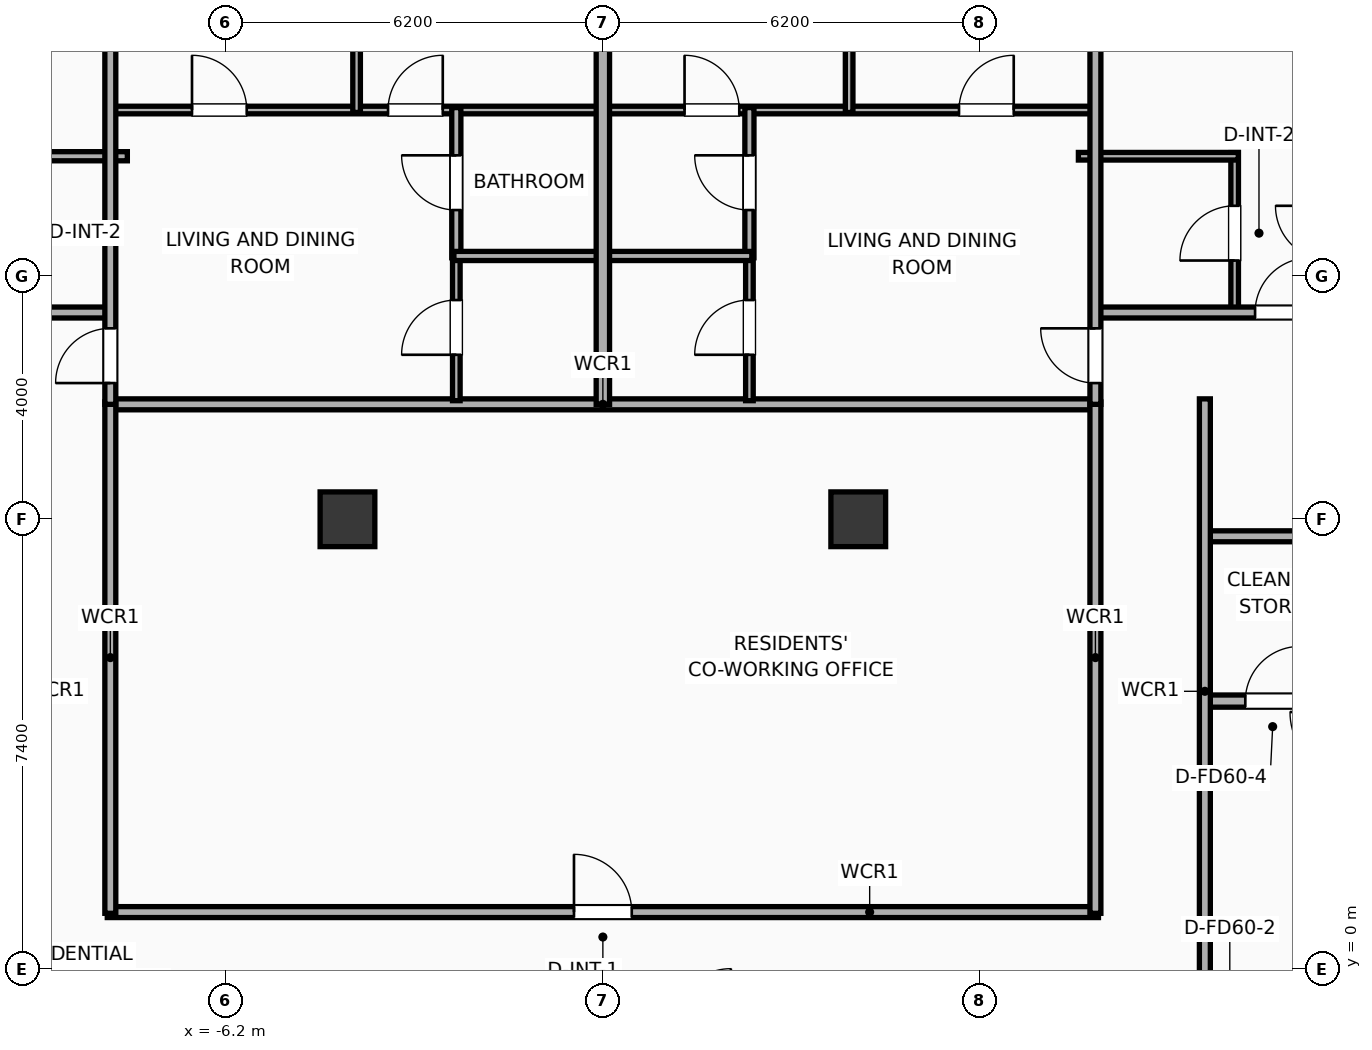
"""IFC4 building model, lengths in metres.
Left out: names, types, materials, properties, quantities, classifications, styles, units other than length and angle.
Written with IfcOpenShell. Run it as: python <this file> out.ifc"""

import sys

from ifc_helpers import new_model, si_unit, direction, frame, frame_2d, origin, origin_2d, place, context, subcontext, project, spatial, rectangle, extrude, element, fill, save


model = new_model("IFC4")
c1 = context("Model", 3, precision=1e-05, world=origin(), true_north=direction((0.0, 1.0)))
c2 = subcontext(c1, "Body", "Model", "MODEL_VIEW")
j1 = project(units=[si_unit("LENGTHUNIT", "METRE"), si_unit("PLANEANGLEUNIT", "RADIAN")], contexts=[c1])
p1 = place(None, origin())
s1 = spatial("IfcSite", under=j1, at=p1, CompositionType="ELEMENT")
p2 = place(p1, origin())
s2 = spatial("IfcBuilding", under=s1, at=p2, CompositionType="ELEMENT")
p3 = place(p2, frame((0.0, 0.0, 140.4)))
s3 = spatial("IfcBuildingStorey", under=s2, at=p3, CompositionType="ELEMENT", Elevation=140.4)
for number, where, z_axis, x_axis in (
    (1, (-4.2, 7.4, 0.0), (0.0, 0.0, 1.0), (1.0, 0.0, 0.0)),
    (2, (4.2, 7.4, 0.0), (0.0, 0.0, 1.0), (1.0, 0.0, 0.0)),
):
    element("IfcColumn", number, at=place(p3, frame(where, z_axis=z_axis, x_axis=x_axis)), inside=s3, PredefinedType="COLUMN", context=c2, shape_type="SweptSolid", body=[
        extrude(rectangle(XDim=0.9, YDim=0.9, at=origin_2d()), origin(), (0.0, 0.0, 1.0), 3.9),
    ])
p4 = place(p3, frame((9.88, 4.41, 0.0), z_axis=(0.0, 0.0, 1.0), x_axis=(1.0, 0.0, 0.0)))
e3 = element("IfcWall", 3, at=p4, inside=s3, PredefinedType="PARTITIONING", context=c2, shape_type="SweptSolid", body=[
    extrude(rectangle(XDim=2.27, YDim=0.2, at=frame_2d((1.135, 0.0))), origin(), (0.0, 0.0, 1.0), 3.65),
])
p5 = place(p4, frame((0.685, 0.0, 0.0)))
e4 = element("IfcOpeningElement", 4, at=p5, cuts=e3, PredefinedType="OPENING", context=c2, shape_type="SweptSolid", body=[
    extrude(rectangle(XDim=0.9, YDim=2.05, at=frame_2d((0.45, 1.025))), frame((0.0, 0.11, 0.0), z_axis=(0.0, -1.0, 0.0), x_axis=(1.0, 0.0, 0.0)), (0.0, 0.0, 1.0), 0.22),
])
p6 = place(p3, frame((9.88, 7.12, 0.0), z_axis=(0.0, 0.0, 1.0), x_axis=(1.0, 0.0, 0.0)))
e5 = element("IfcWall", 5, at=p6, inside=s3, PredefinedType="PARTITIONING", context=c2, shape_type="SweptSolid", body=[
    extrude(rectangle(XDim=2.27, YDim=0.18, at=frame_2d((1.135, 0.0))), origin(), (0.0, 0.0, 1.0), 3.65),
])
p7 = place(p3, frame((9.9, -9.38, 0.0), z_axis=(0.0, 0.0, 1.0), x_axis=(0.0, 1.0, 0.0)))
e6 = element("IfcWall", 6, at=p7, inside=s3, PredefinedType="PARTITIONING", context=c2, shape_type="SweptSolid", body=[
    extrude(rectangle(XDim=18.76, YDim=0.18, at=frame_2d((9.38, 0.0))), origin(), (0.0, 0.0, 1.0), 3.65),
])
p8 = place(p7, frame((7.892, 0.0, 0.0)))
e7 = element("IfcOpeningElement", 7, at=p8, cuts=e6, PredefinedType="OPENING", context=c2, shape_type="SweptSolid", body=[
    extrude(rectangle(XDim=1.1, YDim=2.05, at=frame_2d((0.55, 1.025))), frame((0.0, 0.1, 0.0), z_axis=(0.0, -1.0, 0.0), x_axis=(1.0, 0.0, 0.0)), (0.0, 0.0, 1.0), 0.2),
])
p9 = place(p3, frame((-8.15, 9.29, 0.0), z_axis=(0.0, 0.0, 1.0), x_axis=(1.0, 0.0, 0.0)))
e8 = element("IfcWall", 8, at=p9, inside=s3, PredefinedType="PARTITIONING", context=c2, shape_type="SweptSolid", body=[
    extrude(rectangle(XDim=16.3, YDim=0.18, at=frame_2d((8.15, 0.0))), origin(), (0.0, 0.0, 1.0), 3.65),
])
p10 = place(p3, frame((-8.15, 0.94, 0.0), z_axis=(0.0, 0.0, 1.0), x_axis=(1.0, 0.0, 0.0)))
e9 = element("IfcWall", 9, at=p10, inside=s3, PredefinedType="PARTITIONING", context=c2, shape_type="SweptSolid", body=[
    extrude(rectangle(XDim=16.3, YDim=0.18, at=frame_2d((8.15, 0.0))), origin(), (0.0, 0.0, 1.0), 3.65),
])
p11 = place(p10, frame((7.675, 0.0, 0.0)))
e10 = element("IfcOpeningElement", 10, at=p11, cuts=e9, PredefinedType="OPENING", context=c2, shape_type="SweptSolid", body=[
    extrude(rectangle(XDim=0.95, YDim=2.05, at=frame_2d((0.475, 1.025))), frame((0.0, 0.1, 0.0), z_axis=(0.0, -1.0, 0.0), x_axis=(1.0, 0.0, 0.0)), (0.0, 0.0, 1.0), 0.2),
])
for number, where, z_axis, x_axis in (
    (11, (-8.1, 0.92, 0.0), (0.0, 0.0, 1.0), (0.0, 1.0, 0.0)),
    (12, (8.1, 0.92, 0.0), (0.0, 0.0, 1.0), (0.0, 1.0, 0.0)),
):
    element("IfcWall", number, at=place(p3, frame(where, z_axis=z_axis, x_axis=x_axis)), inside=s3, PredefinedType="PARTITIONING", context=c2, shape_type="SweptSolid", body=[
        extrude(rectangle(XDim=8.41, YDim=0.18, at=frame_2d((4.205, 0.0))), origin(), (0.0, 0.0, 1.0), 3.65),
    ])
p12 = place(p3, frame((-10.169, 13.37, 0.0), z_axis=(0.0, 0.0, 1.0), x_axis=(1.0, 0.0, 0.0)))
e13 = element("IfcWall", 13, at=p12, inside=s3, PredefinedType="PLUMBINGWALL", context=c2, shape_type="SweptSolid", body=[
    extrude(rectangle(XDim=2.349, YDim=0.15, at=frame_2d((1.174, 0.0))), origin(), (0.0, 0.0, 1.0), 3.65),
])
p13 = place(p3, frame((10.39, 10.78, 0.0), z_axis=(0.0, 0.0, 1.0), x_axis=(0.0, 1.0, 0.0)))
e14 = element("IfcWall", 14, at=p13, inside=s3, PredefinedType="PARTITIONING", context=c2, shape_type="SweptSolid", body=[
    extrude(rectangle(XDim=2.65, YDim=0.125, at=frame_2d((1.325, 0.0))), origin(), (0.0, 0.0, 1.0), 3.65),
])
p14 = place(p13, frame((0.875, 0.0, 0.0)))
e15 = element("IfcOpeningElement", 15, at=p14, cuts=e14, PredefinedType="OPENING", context=c2, shape_type="SweptSolid", body=[
    extrude(rectangle(XDim=0.9, YDim=2.05, at=frame_2d((0.45, 1.025))), frame((0.0, 0.073, 0.0), z_axis=(0.0, -1.0, 0.0), x_axis=(1.0, 0.0, 0.0)), (0.0, 0.0, 1.0), 0.145),
])
p15 = place(p3, frame((7.82, 13.37, 0.0), z_axis=(0.0, 0.0, 1.0), x_axis=(1.0, 0.0, 0.0)))
e16 = element("IfcWall", 16, at=p15, inside=s3, PredefinedType="PARTITIONING", context=c2, shape_type="SweptSolid", body=[
    extrude(rectangle(XDim=2.63, YDim=0.125, at=frame_2d((1.315, 0.0))), origin(), (0.0, 0.0, 1.0), 3.65),
])
p16 = place(p3, frame((-20.0, 10.8, 0.0), z_axis=(0.0, 0.0, 1.0), x_axis=(1.0, 0.0, 0.0)))
e17 = element("IfcWall", 17, at=p16, inside=s3, PredefinedType="PARTITIONING", context=c2, shape_type="SweptSolid", body=[
    extrude(rectangle(XDim=11.92, YDim=0.18, at=frame_2d((5.96, 0.0))), origin(), (0.0, 0.0, 1.0), 3.65),
])
p17 = place(p16, frame((3.64, 0.0, 0.0)))
e18 = element("IfcOpeningElement", 18, at=p17, cuts=e17, PredefinedType="OPENING", context=c2, shape_type="SweptSolid", body=[
    extrude(rectangle(XDim=1.15, YDim=2.05, at=frame_2d((0.575, 1.025))), frame((0.0, 0.1, 0.0), z_axis=(0.0, -1.0, 0.0), x_axis=(1.0, 0.0, 0.0)), (0.0, 0.0, 1.0), 0.2),
])
p18 = place(p16, frame((8.656, 0.0, 0.0)))
e19 = element("IfcOpeningElement", 19, at=p18, cuts=e17, PredefinedType="OPENING", context=c2, shape_type="SweptSolid", body=[
    extrude(rectangle(XDim=0.9, YDim=2.05, at=frame_2d((0.45, 1.025))), frame((0.0, 0.1, 0.0), z_axis=(0.0, -1.0, 0.0), x_axis=(1.0, 0.0, 0.0)), (0.0, 0.0, 1.0), 0.2),
])
p19 = place(p3, frame((8.08, 10.8, 0.0), z_axis=(0.0, 0.0, 1.0), x_axis=(1.0, 0.0, 0.0)))
e20 = element("IfcWall", 20, at=p19, inside=s3, PredefinedType="PARTITIONING", context=c2, shape_type="SweptSolid", body=[
    extrude(rectangle(XDim=11.92, YDim=0.18, at=frame_2d((5.96, 0.0))), origin(), (0.0, 0.0, 1.0), 3.65),
])
p20 = place(p19, frame((2.646, 0.0, 0.0)))
e21 = element("IfcOpeningElement", 21, at=p20, cuts=e20, PredefinedType="OPENING", context=c2, shape_type="SweptSolid", body=[
    extrude(rectangle(XDim=0.9, YDim=2.05, at=frame_2d((0.45, 1.025))), frame((0.0, 0.1, 0.0), z_axis=(0.0, -1.0, 0.0), x_axis=(1.0, 0.0, 0.0)), (0.0, 0.0, 1.0), 0.2),
])
p21 = place(p19, frame((7.179, 0.0, 0.0)))
e22 = element("IfcOpeningElement", 22, at=p21, cuts=e20, PredefinedType="OPENING", context=c2, shape_type="SweptSolid", body=[
    extrude(rectangle(XDim=1.15, YDim=2.05, at=frame_2d((0.575, 1.025))), frame((0.0, 0.1, 0.0), z_axis=(0.0, -1.0, 0.0), x_axis=(1.0, 0.0, 0.0)), (0.0, 0.0, 1.0), 0.2),
])
p22 = place(p3, frame((-8.08, 14.13, 0.0), z_axis=(0.0, 0.0, 1.0), x_axis=(1.0, 0.0, 0.0)))
e23 = element("IfcWall", 23, at=p22, inside=s3, PredefinedType="PARTITIONING", context=c2, shape_type="SweptSolid", body=[
    extrude(rectangle(XDim=8.06, YDim=0.125, at=frame_2d((4.03, 0.0))), origin(), (0.0, 0.0, 1.0), 3.65),
])
p23 = place(p22, frame((1.323, 0.0, 0.0)))
e24 = element("IfcOpeningElement", 24, at=p23, cuts=e23, PredefinedType="OPENING", context=c2, shape_type="SweptSolid", body=[
    extrude(rectangle(XDim=0.9, YDim=2.05, at=frame_2d((0.45, 1.025))), frame((0.0, 0.073, 0.0), z_axis=(0.0, -1.0, 0.0), x_axis=(1.0, 0.0, 0.0)), (0.0, 0.0, 1.0), 0.145),
])
p24 = place(p22, frame((4.547, 0.0, 0.0)))
e25 = element("IfcOpeningElement", 25, at=p24, cuts=e23, PredefinedType="OPENING", context=c2, shape_type="SweptSolid", body=[
    extrude(rectangle(XDim=0.9, YDim=2.05, at=frame_2d((0.45, 1.025))), frame((0.0, 0.073, 0.0), z_axis=(0.0, -1.0, 0.0), x_axis=(1.0, 0.0, 0.0)), (0.0, 0.0, 1.0), 0.145),
])
p25 = place(p3, frame((-2.41, 9.35, 0.0), z_axis=(0.0, 0.0, 1.0), x_axis=(0.0, 1.0, 0.0)))
e26 = element("IfcWall", 26, at=p25, inside=s3, PredefinedType="PARTITIONING", context=c2, shape_type="SweptSolid", body=[
    extrude(rectangle(XDim=2.41, YDim=0.125, at=frame_2d((1.205, 0.0))), origin(), (0.0, 0.0, 1.0), 2.54),
])
p26 = place(p25, frame((0.755, 0.0, 0.0)))
e27 = element("IfcOpeningElement", 27, at=p26, cuts=e26, PredefinedType="OPENING", context=c2, shape_type="SweptSolid", body=[
    extrude(rectangle(XDim=0.9, YDim=2.05, at=frame_2d((0.45, 1.025))), frame((0.0, 0.073, 0.0), z_axis=(0.0, -1.0, 0.0), x_axis=(1.0, 0.0, 0.0)), (0.0, 0.0, 1.0), 0.145),
])
p27 = place(p3, frame((-2.41, 11.7, 0.0), z_axis=(0.0, 0.0, 1.0), x_axis=(0.0, 1.0, 0.0)))
e28 = element("IfcWall", 28, at=p27, inside=s3, PredefinedType="PLUMBINGWALL", context=c2, shape_type="SweptSolid", body=[
    extrude(rectangle(XDim=2.47, YDim=0.15, at=frame_2d((1.235, 0.0))), origin(), (0.0, 0.0, 1.0), 2.54),
])
p28 = place(p27, frame((0.785, 0.0, 0.0)))
e29 = element("IfcOpeningElement", 29, at=p28, cuts=e28, PredefinedType="OPENING", context=c2, shape_type="SweptSolid", body=[
    extrude(rectangle(XDim=0.9, YDim=2.05, at=frame_2d((0.45, 1.025))), frame((0.0, 0.085, 0.0), z_axis=(0.0, -1.0, 0.0), x_axis=(1.0, 0.0, 0.0)), (0.0, 0.0, 1.0), 0.17),
])
p29 = place(p3, frame((-2.45, 11.73, 0.0), z_axis=(0.0, 0.0, 1.0), x_axis=(1.0, 0.0, 0.0)))
e30 = element("IfcWall", 30, at=p29, inside=s3, PredefinedType="PLUMBINGWALL", context=c2, shape_type="SweptSolid", body=[
    extrude(rectangle(XDim=2.43, YDim=0.15, at=frame_2d((1.215, 0.0))), origin(), (0.0, 0.0, 1.0), 3.65),
])
p30 = place(p3, frame((-4.05, 14.09, 0.0), z_axis=(0.0, 0.0, 1.0), x_axis=(0.0, 1.0, 0.0)))
e31 = element("IfcWall", 31, at=p30, inside=s3, PredefinedType="PARTITIONING", context=c2, shape_type="SweptSolid", body=[
    extrude(rectangle(XDim=5.562, YDim=0.125, at=frame_2d((2.781, 0.0))), origin(), (0.0, 0.0, 1.0), 3.65),
])
p31 = place(p3, frame((-8.1, 9.29, 0.0), z_axis=(0.0, 0.0, 1.0), x_axis=(0.0, 1.0, 0.0)))
e32 = element("IfcWall", 32, at=p31, inside=s3, PredefinedType="PARTITIONING", context=c2, shape_type="SweptSolid", body=[
    extrude(rectangle(XDim=9.936, YDim=0.18, at=frame_2d((4.968, 0.0))), origin(), (0.0, 0.0, 1.0), 3.65),
])
p32 = place(p31, frame((0.35, 0.0, 0.0)))
e33 = element("IfcOpeningElement", 33, at=p32, cuts=e32, PredefinedType="OPENING", context=c2, shape_type="SweptSolid", body=[
    extrude(rectangle(XDim=0.9, YDim=2.05, at=frame_2d((0.45, 1.025))), frame((0.0, 0.1, 0.0), z_axis=(0.0, -1.0, 0.0), x_axis=(1.0, 0.0, 0.0)), (0.0, 0.0, 1.0), 0.2),
])
p33 = place(p3, frame((0.02, 14.13, 0.0), z_axis=(0.0, 0.0, 1.0), x_axis=(1.0, 0.0, 0.0)))
e34 = element("IfcWall", 34, at=p33, inside=s3, PredefinedType="PARTITIONING", context=c2, shape_type="SweptSolid", body=[
    extrude(rectangle(XDim=8.06, YDim=0.125, at=frame_2d((4.03, 0.0))), origin(), (0.0, 0.0, 1.0), 3.65),
])
p34 = place(p33, frame((1.323, 0.0, 0.0)))
e35 = element("IfcOpeningElement", 35, at=p34, cuts=e34, PredefinedType="OPENING", context=c2, shape_type="SweptSolid", body=[
    extrude(rectangle(XDim=0.9, YDim=2.05, at=frame_2d((0.45, 1.025))), frame((0.0, 0.073, 0.0), z_axis=(0.0, -1.0, 0.0), x_axis=(1.0, 0.0, 0.0)), (0.0, 0.0, 1.0), 0.145),
])
p35 = place(p33, frame((5.837, 0.0, 0.0)))
e36 = element("IfcOpeningElement", 36, at=p35, cuts=e34, PredefinedType="OPENING", context=c2, shape_type="SweptSolid", body=[
    extrude(rectangle(XDim=0.9, YDim=2.05, at=frame_2d((0.45, 1.025))), frame((0.0, 0.073, 0.0), z_axis=(0.0, -1.0, 0.0), x_axis=(1.0, 0.0, 0.0)), (0.0, 0.0, 1.0), 0.145),
])
p36 = place(p3, frame((2.41, 9.35, 0.0), z_axis=(0.0, 0.0, 1.0), x_axis=(0.0, 1.0, 0.0)))
e37 = element("IfcWall", 37, at=p36, inside=s3, PredefinedType="PARTITIONING", context=c2, shape_type="SweptSolid", body=[
    extrude(rectangle(XDim=2.41, YDim=0.125, at=frame_2d((1.205, 0.0))), origin(), (0.0, 0.0, 1.0), 3.65),
])
p37 = place(p36, frame((0.755, 0.0, 0.0)))
e38 = element("IfcOpeningElement", 38, at=p37, cuts=e37, PredefinedType="OPENING", context=c2, shape_type="SweptSolid", body=[
    extrude(rectangle(XDim=0.9, YDim=2.05, at=frame_2d((0.45, 1.025))), frame((0.0, 0.073, 0.0), z_axis=(0.0, -1.0, 0.0), x_axis=(1.0, 0.0, 0.0)), (0.0, 0.0, 1.0), 0.145),
])
p38 = place(p3, frame((2.41, 11.7, 0.0), z_axis=(0.0, 0.0, 1.0), x_axis=(0.0, 1.0, 0.0)))
e39 = element("IfcWall", 39, at=p38, inside=s3, PredefinedType="PLUMBINGWALL", context=c2, shape_type="SweptSolid", body=[
    extrude(rectangle(XDim=2.47, YDim=0.15, at=frame_2d((1.235, 0.0))), origin(), (0.0, 0.0, 1.0), 3.65),
])
p39 = place(p38, frame((0.785, 0.0, 0.0)))
e40 = element("IfcOpeningElement", 40, at=p39, cuts=e39, PredefinedType="OPENING", context=c2, shape_type="SweptSolid", body=[
    extrude(rectangle(XDim=0.9, YDim=2.05, at=frame_2d((0.45, 1.025))), frame((0.0, 0.085, 0.0), z_axis=(0.0, -1.0, 0.0), x_axis=(1.0, 0.0, 0.0)), (0.0, 0.0, 1.0), 0.17),
])
p40 = place(p3, frame((0.02, 11.73, 0.0), z_axis=(0.0, 0.0, 1.0), x_axis=(1.0, 0.0, 0.0)))
e41 = element("IfcWall", 41, at=p40, inside=s3, PredefinedType="PLUMBINGWALL", context=c2, shape_type="SweptSolid", body=[
    extrude(rectangle(XDim=2.43, YDim=0.15, at=frame_2d((1.215, 0.0))), origin(), (0.0, 0.0, 1.0), 3.65),
])
p41 = place(p3, frame((4.05, 14.09, 0.0), z_axis=(0.0, 0.0, 1.0), x_axis=(0.0, 1.0, 0.0)))
e42 = element("IfcWall", 42, at=p41, inside=s3, PredefinedType="PARTITIONING", context=c2, shape_type="SweptSolid", body=[
    extrude(rectangle(XDim=6.413, YDim=0.125, at=frame_2d((3.207, 0.0))), origin(), (0.0, 0.0, 1.0), 3.65),
])
p42 = place(p3, frame((8.1, 9.29, 0.0), z_axis=(0.0, 0.0, 1.0), x_axis=(0.0, 1.0, 0.0)))
e43 = element("IfcWall", 43, at=p42, inside=s3, PredefinedType="PARTITIONING", context=c2, shape_type="SweptSolid", body=[
    extrude(rectangle(XDim=11.639, YDim=0.18, at=frame_2d((5.82, 0.0))), origin(), (0.0, 0.0, 1.0), 3.65),
])
p43 = place(p42, frame((0.35, 0.0, 0.0)))
e44 = element("IfcOpeningElement", 44, at=p43, cuts=e43, PredefinedType="OPENING", context=c2, shape_type="SweptSolid", body=[
    extrude(rectangle(XDim=0.9, YDim=2.05, at=frame_2d((0.45, 1.025))), frame((0.0, 0.1, 0.0), z_axis=(0.0, -1.0, 0.0), x_axis=(1.0, 0.0, 0.0)), (0.0, 0.0, 1.0), 0.2),
])
p44 = place(p3, frame((0.0, 9.29, 0.0), z_axis=(0.0, 0.0, 1.0), x_axis=(0.0, 1.0, 0.0)))
e45 = element("IfcWall", 45, at=p44, inside=s3, PredefinedType="PARTITIONING", context=c2, shape_type="SweptSolid", body=[
    extrude(rectangle(XDim=10.788, YDim=0.22, at=frame_2d((5.394, 0.0))), origin(), (0.0, 0.0, 1.0), 2.54),
])
p45 = place(p5, origin())
e46 = element("IfcDoor", 46, at=p45, inside=s3, OperationType="SINGLE_SWING_RIGHT", PredefinedType="DOOR", context=c2, shape_type="SweptSolid", body=[
    extrude(rectangle(XDim=0.9, YDim=2.05, at=frame_2d((0.45, 1.025))), frame((0.0, 0.025, 0.0), z_axis=(0.0, -1.0, 0.0), x_axis=(1.0, 0.0, 0.0)), (0.0, 0.0, 1.0), 0.05),
])
fill(e4, e46)
p46 = place(p11, origin())
e47 = element("IfcDoor", 47, at=p46, inside=s3, OperationType="SINGLE_SWING_LEFT", PredefinedType="DOOR", context=c2, shape_type="SweptSolid", body=[
    extrude(rectangle(XDim=0.95, YDim=2.05, at=frame_2d((0.475, 1.025))), frame((0.0, 0.025, 0.0), z_axis=(0.0, -1.0, 0.0), x_axis=(1.0, 0.0, 0.0)), (0.0, 0.0, 1.0), 0.05),
])
fill(e10, e47)
p47 = place(p14, origin())
e48 = element("IfcDoor", 48, at=p47, inside=s3, OperationType="SINGLE_SWING_LEFT", PredefinedType="DOOR", context=c2, shape_type="SweptSolid", body=[
    extrude(rectangle(XDim=0.9, YDim=2.05, at=frame_2d((0.45, 1.025))), frame((0.0, 0.025, 0.0), z_axis=(0.0, -1.0, 0.0), x_axis=(1.0, 0.0, 0.0)), (0.0, 0.0, 1.0), 0.05),
])
fill(e15, e48)
p48 = place(p20, origin())
e49 = element("IfcDoor", 49, at=p48, inside=s3, OperationType="SINGLE_SWING_RIGHT", PredefinedType="DOOR", context=c2, shape_type="SweptSolid", body=[
    extrude(rectangle(XDim=0.9, YDim=2.05, at=frame_2d((0.45, 1.025))), frame((0.0, 0.025, 0.0), z_axis=(0.0, -1.0, 0.0), x_axis=(1.0, 0.0, 0.0)), (0.0, 0.0, 1.0), 0.05),
])
fill(e21, e49)
p49 = place(p23, origin())
e50 = element("IfcDoor", 50, at=p49, inside=s3, OperationType="SINGLE_SWING_LEFT", PredefinedType="DOOR", context=c2, shape_type="SweptSolid", body=[
    extrude(rectangle(XDim=0.9, YDim=2.05, at=frame_2d((0.45, 1.025))), frame((0.0, 0.025, 0.0), z_axis=(0.0, -1.0, 0.0), x_axis=(1.0, 0.0, 0.0)), (0.0, 0.0, 1.0), 0.05),
])
fill(e24, e50)
p50 = place(p24, origin())
e51 = element("IfcDoor", 51, at=p50, inside=s3, OperationType="SINGLE_SWING_RIGHT", PredefinedType="DOOR", context=c2, shape_type="SweptSolid", body=[
    extrude(rectangle(XDim=0.9, YDim=2.05, at=frame_2d((0.45, 1.025))), frame((0.0, 0.025, 0.0), z_axis=(0.0, -1.0, 0.0), x_axis=(1.0, 0.0, 0.0)), (0.0, 0.0, 1.0), 0.05),
])
fill(e25, e51)
p51 = place(p26, origin())
e52 = element("IfcDoor", 52, at=p51, inside=s3, OperationType="SINGLE_SWING_LEFT", PredefinedType="DOOR", context=c2, shape_type="SweptSolid", body=[
    extrude(rectangle(XDim=0.9, YDim=2.05, at=frame_2d((0.45, 1.025))), frame((0.0, 0.025, 0.0), z_axis=(0.0, -1.0, 0.0), x_axis=(1.0, 0.0, 0.0)), (0.0, 0.0, 1.0), 0.05),
])
fill(e27, e52)
p52 = place(p28, origin())
e53 = element("IfcDoor", 53, at=p52, inside=s3, OperationType="SINGLE_SWING_RIGHT", PredefinedType="DOOR", context=c2, shape_type="SweptSolid", body=[
    extrude(rectangle(XDim=0.9, YDim=2.05, at=frame_2d((0.45, 1.025))), frame((0.0, 0.025, 0.0), z_axis=(0.0, -1.0, 0.0), x_axis=(1.0, 0.0, 0.0)), (0.0, 0.0, 1.0), 0.05),
])
fill(e29, e53)
p53 = place(p32, origin())
e54 = element("IfcDoor", 54, at=p53, inside=s3, OperationType="SINGLE_SWING_LEFT", PredefinedType="DOOR", context=c2, shape_type="SweptSolid", body=[
    extrude(rectangle(XDim=0.9, YDim=2.05, at=frame_2d((0.45, 1.025))), frame((0.0, 0.025, 0.0), z_axis=(0.0, -1.0, 0.0), x_axis=(1.0, 0.0, 0.0)), (0.0, 0.0, 1.0), 0.05),
])
fill(e33, e54)
p54 = place(p34, origin())
e55 = element("IfcDoor", 55, at=p54, inside=s3, OperationType="SINGLE_SWING_LEFT", PredefinedType="DOOR", context=c2, shape_type="SweptSolid", body=[
    extrude(rectangle(XDim=0.9, YDim=2.05, at=frame_2d((0.45, 1.025))), frame((0.0, 0.025, 0.0), z_axis=(0.0, -1.0, 0.0), x_axis=(1.0, 0.0, 0.0)), (0.0, 0.0, 1.0), 0.05),
])
fill(e35, e55)
p55 = place(p35, origin())
e56 = element("IfcDoor", 56, at=p55, inside=s3, OperationType="SINGLE_SWING_RIGHT", PredefinedType="DOOR", context=c2, shape_type="SweptSolid", body=[
    extrude(rectangle(XDim=0.9, YDim=2.05, at=frame_2d((0.45, 1.025))), frame((0.0, 0.025, 0.0), z_axis=(0.0, -1.0, 0.0), x_axis=(1.0, 0.0, 0.0)), (0.0, 0.0, 1.0), 0.05),
])
fill(e36, e56)
p56 = place(p37, origin())
e57 = element("IfcDoor", 57, at=p56, inside=s3, OperationType="SINGLE_SWING_LEFT", PredefinedType="DOOR", context=c2, shape_type="SweptSolid", body=[
    extrude(rectangle(XDim=0.9, YDim=2.05, at=frame_2d((0.45, 1.025))), frame((0.0, 0.025, 0.0), z_axis=(0.0, -1.0, 0.0), x_axis=(1.0, 0.0, 0.0)), (0.0, 0.0, 1.0), 0.05),
])
fill(e38, e57)
p57 = place(p39, origin())
e58 = element("IfcDoor", 58, at=p57, inside=s3, OperationType="SINGLE_SWING_RIGHT", PredefinedType="DOOR", context=c2, shape_type="SweptSolid", body=[
    extrude(rectangle(XDim=0.9, YDim=2.05, at=frame_2d((0.45, 1.025))), frame((0.0, 0.025, 0.0), z_axis=(0.0, -1.0, 0.0), x_axis=(1.0, 0.0, 0.0)), (0.0, 0.0, 1.0), 0.05),
])
fill(e40, e58)
p58 = place(p43, origin())
e59 = element("IfcDoor", 59, at=p58, inside=s3, OperationType="SINGLE_SWING_RIGHT", PredefinedType="DOOR", context=c2, shape_type="SweptSolid", body=[
    extrude(rectangle(XDim=0.9, YDim=2.05, at=frame_2d((0.45, 1.025))), frame((0.0, 0.025, 0.0), z_axis=(0.0, -1.0, 0.0), x_axis=(1.0, 0.0, 0.0)), (0.0, 0.0, 1.0), 0.05),
])
fill(e44, e59)
save(model, sys.argv[1])
